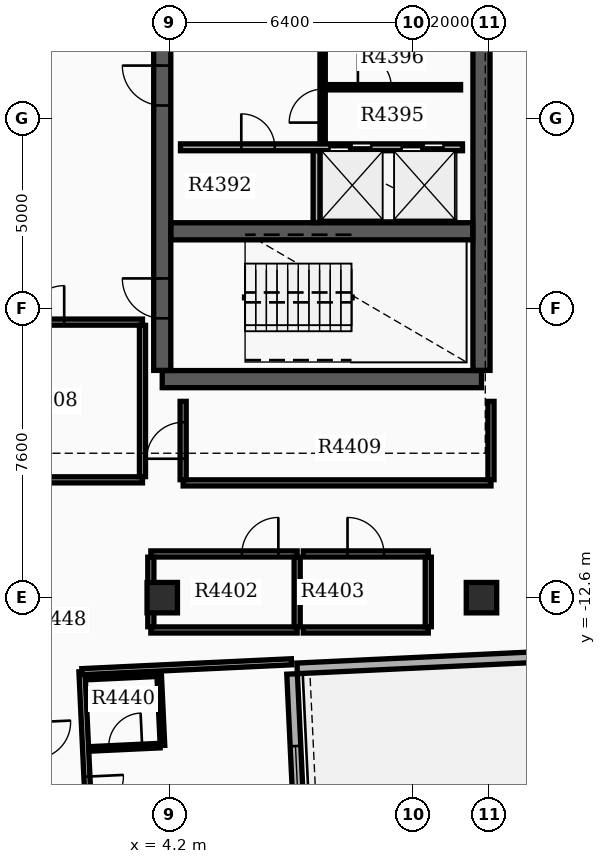
"""IFC4 building model, lengths in metres.
Left out: names, types, materials, properties, quantities, classifications, styles, units other than length and angle.
Written with IfcOpenShell. Run it as: python <this file> out.ifc"""

import sys

from ifc_helpers import new_model, si_unit, direction, frame, frame_2d, origin, origin_2d, place, context, subcontext, project, spatial, rectangle, extrude, element, fill, save


model = new_model("IFC4")
c1 = context("Model", 3, precision=1e-05, world=origin(), true_north=direction((0.0, 1.0)))
c2 = subcontext(c1, "Body", "Model", "MODEL_VIEW")
j1 = project(units=[si_unit("LENGTHUNIT", "METRE"), si_unit("PLANEANGLEUNIT", "RADIAN")], contexts=[c1])
p1 = place(None, origin())
s1 = spatial("IfcSite", under=j1, at=p1, CompositionType="ELEMENT")
p2 = place(p1, origin())
s2 = spatial("IfcBuilding", under=s1, at=p2, CompositionType="ELEMENT")
p3 = place(p2, frame((0.0, 0.0, 277.2)))
s3 = spatial("IfcBuildingStorey", under=s2, at=p3, CompositionType="ELEMENT", Elevation=277.2)
p4 = place(p3, frame((4.0, -6.85, 0.0), z_axis=(0.0, 0.0, 1.0), x_axis=(1.0, 0.0, 0.0)))
e1 = element("IfcWall", 1, at=p4, inside=s3, PredefinedType="SHEAR", context=c2, shape_type="SweptSolid", body=[
    extrude(rectangle(XDim=8.4, YDim=0.45, at=frame_2d((4.2, 0.0))), origin(), (0.0, 0.0, 1.0), 3.7),
])
p5 = place(p3, frame((4.0, -6.62, 0.0), z_axis=(0.0, 0.0, 1.0), x_axis=(0.0, 1.0, 0.0)))
e2 = element("IfcWall", 2, at=p5, inside=s3, PredefinedType="SHEAR", context=c2, shape_type="SweptSolid", body=[
    extrude(rectangle(XDim=11.34, YDim=0.45, at=frame_2d((5.67, 0.0))), origin(), (0.0, 0.0, 1.0), 3.7),
])
p6 = place(p5, frame((1.37, 0.0, 0.0)))
e3 = element("IfcOpeningElement", 3, at=p6, cuts=e2, PredefinedType="OPENING", context=c2, shape_type="SweptSolid", body=[
    extrude(rectangle(XDim=1.05, YDim=2.15, at=frame_2d((0.525, 1.075))), frame((0.0, 0.235, 0.0), z_axis=(0.0, -1.0, 0.0), x_axis=(1.0, 0.0, 0.0)), (0.0, 0.0, 1.0), 0.47),
])
p7 = place(p5, frame((6.97, 0.0, 0.0)))
e4 = element("IfcOpeningElement", 4, at=p7, cuts=e2, PredefinedType="OPENING", context=c2, shape_type="SweptSolid", body=[
    extrude(rectangle(XDim=1.05, YDim=2.15, at=frame_2d((0.525, 1.075))), frame((0.0, 0.235, 0.0), z_axis=(0.0, -1.0, 0.0), x_axis=(1.0, 0.0, 0.0)), (0.0, 0.0, 1.0), 0.47),
])
p8 = place(p3, frame((12.4, -6.62, 0.0), z_axis=(0.0, 0.0, 1.0), x_axis=(0.0, 1.0, 0.0)))
e5 = element("IfcWall", 5, at=p8, inside=s3, PredefinedType="SHEAR", context=c2, shape_type="SweptSolid", body=[
    extrude(rectangle(XDim=11.34, YDim=0.45, at=frame_2d((5.67, 0.0))), origin(), (0.0, 0.0, 1.0), 3.7),
])
p9 = place(p3, frame((4.23, -2.96, 0.0), z_axis=(0.0, 0.0, 1.0), x_axis=(1.0, 0.0, 0.0)))
e6 = element("IfcWall", 6, at=p9, inside=s3, PredefinedType="SHEAR", context=c2, shape_type="SweptSolid", body=[
    extrude(rectangle(XDim=7.94, YDim=0.45, at=frame_2d((3.97, 0.0))), origin(), (0.0, 0.0, 1.0), 3.7),
])
for number, where, z_axis, x_axis in (
    (7, (12.4, -12.6, 0.0), (0.0, 0.0, 1.0), (1.0, 0.0, 0.0)),
    (8, (4.0, -12.6, 0.0), (0.0, 0.0, 1.0), (1.0, 0.0, 0.0)),
):
    element("IfcColumn", number, at=place(p3, frame(where, z_axis=z_axis, x_axis=x_axis)), inside=s3, PredefinedType="COLUMN", context=c2, shape_type="SweptSolid", body=[
        extrude(rectangle(XDim=0.8, YDim=0.8, at=origin_2d()), origin(), (0.0, 0.0, 1.0), 3.9),
    ])
p10 = place(p3, frame((8.109, -29.291, 0.0), z_axis=(0.0, 0.0, 1.0), x_axis=(-0.047117735191, 0.998889342735, 0.0)))
e9 = element("IfcWall", 9, at=p10, inside=s3, PredefinedType="STANDARD", context=c2, shape_type="SweptSolid", body=[
    extrude(rectangle(XDim=14.7, YDim=0.28, at=frame_2d((7.35, 0.0))), origin(), (0.0, 0.0, 1.0), 3.18),
])
p11 = place(p10, frame((1.6, 0.0, 0.8)))
e10 = element("IfcOpeningElement", 10, at=p11, cuts=e9, PredefinedType="OPENING", context=c2, shape_type="SweptSolid", body=[
    extrude(rectangle(XDim=1.6, YDim=1.7, at=frame_2d((0.8, 0.85))), frame((0.0, 0.15, 0.0), z_axis=(0.0, -1.0, 0.0), x_axis=(1.0, 0.0, 0.0)), (0.0, 0.0, 1.0), 0.3),
])
p12 = place(p10, frame((4.8, 0.0, 0.8)))
e11 = element("IfcOpeningElement", 11, at=p12, cuts=e9, PredefinedType="OPENING", context=c2, shape_type="SweptSolid", body=[
    extrude(rectangle(XDim=1.6, YDim=1.7, at=frame_2d((0.8, 0.85))), frame((0.0, 0.15, 0.0), z_axis=(0.0, -1.0, 0.0), x_axis=(1.0, 0.0, 0.0)), (0.0, 0.0, 1.0), 0.3),
])
p13 = place(p10, frame((8.0, 0.0, 0.8)))
e12 = element("IfcOpeningElement", 12, at=p13, cuts=e9, PredefinedType="OPENING", context=c2, shape_type="SweptSolid", body=[
    extrude(rectangle(XDim=1.6, YDim=1.7, at=frame_2d((0.8, 0.85))), frame((0.0, 0.15, 0.0), z_axis=(0.0, -1.0, 0.0), x_axis=(1.0, 0.0, 0.0)), (0.0, 0.0, 1.0), 0.3),
])
p14 = place(p10, frame((11.2, 0.0, 0.8)))
e13 = element("IfcOpeningElement", 13, at=p14, cuts=e9, PredefinedType="OPENING", context=c2, shape_type="SweptSolid", body=[
    extrude(rectangle(XDim=1.6, YDim=1.7, at=frame_2d((0.8, 0.85))), frame((0.0, 0.15, 0.0), z_axis=(0.0, -1.0, 0.0), x_axis=(1.0, 0.0, 0.0)), (0.0, 0.0, 1.0), 0.3),
])
p15 = place(p3, frame((13.843, -14.164, 0.0), z_axis=(0.0, 0.0, 1.0), x_axis=(-0.998889082162, -0.047123258997, 0.0)))
e14 = element("IfcWall", 14, at=p15, inside=s3, PredefinedType="STANDARD", context=c2, shape_type="SweptSolid", body=[
    extrude(rectangle(XDim=6.3, YDim=0.28, at=frame_2d((3.15, 0.0))), origin(), (0.0, 0.0, 1.0), 3.18),
])
p16 = place(p3, frame((4.48, -0.75, 0.0), z_axis=(0.0, 0.0, 1.0), x_axis=(1.0, 0.0, 0.0)))
e15 = element("IfcWall", 15, at=p16, inside=s3, PredefinedType="SOLIDWALL", context=c2, shape_type="SweptSolid", body=[
    extrude(rectangle(XDim=7.42, YDim=0.18, at=frame_2d((3.71, 0.0))), origin(), (0.0, 0.0, 1.0), 3.17),
])
p17 = place(p16, frame((3.92, 0.0, 0.0)))
e16 = element("IfcOpeningElement", 16, at=p17, cuts=e15, PredefinedType="OPENING", context=c2, shape_type="SweptSolid", body=[
    extrude(rectangle(XDim=1.1, YDim=2.15, at=frame_2d((0.55, 1.075))), frame((0.0, 0.1, 0.0), z_axis=(0.0, -1.0, 0.0), x_axis=(1.0, 0.0, 0.0)), (0.0, 0.0, 1.0), 0.2),
])
p18 = place(p16, frame((5.82, 0.0, 0.0)))
e17 = element("IfcOpeningElement", 17, at=p18, cuts=e15, PredefinedType="OPENING", context=c2, shape_type="SweptSolid", body=[
    extrude(rectangle(XDim=1.1, YDim=2.15, at=frame_2d((0.55, 1.075))), frame((0.0, 0.1, 0.0), z_axis=(0.0, -1.0, 0.0), x_axis=(1.0, 0.0, 0.0)), (0.0, 0.0, 1.0), 0.2),
])
p19 = place(p16, frame((1.6, 0.0, 0.0)))
e18 = element("IfcOpeningElement", 18, at=p19, cuts=e15, PredefinedType="OPENING", context=c2, shape_type="SweptSolid", body=[
    extrude(rectangle(XDim=0.88, YDim=2.1, at=frame_2d((0.44, 1.05))), frame((0.0, 0.1, 0.0), z_axis=(0.0, -1.0, 0.0), x_axis=(1.0, 0.0, 0.0)), (0.0, 0.0, 1.0), 0.2),
])
p20 = place(p3, frame((8.06, -2.73, 0.0), z_axis=(0.0, 0.0, 1.0), x_axis=(0.0, 1.0, 0.0)))
e19 = element("IfcWall", 19, at=p20, inside=s3, PredefinedType="SOLIDWALL", context=c2, shape_type="SweptSolid", body=[
    extrude(rectangle(XDim=1.89, YDim=0.18, at=frame_2d((0.945, 0.0))), origin(), (0.0, 0.0, 1.0), 3.17),
])
p21 = place(p3, frame((8.22, -0.65, 0.0), z_axis=(0.0, 0.0, 1.0), x_axis=(0.0, 1.0, 0.0)))
e20 = element("IfcWall", 20, at=p21, inside=s3, PredefinedType="SOLIDWALL", context=c2, shape_type="SweptSolid", body=[
    extrude(rectangle(XDim=2.96, YDim=0.14, at=frame_2d((1.48, 0.0))), origin(), (0.0, 0.0, 1.0), 3.17),
])
p22 = place(p21, frame((0.55, 0.0, 0.0)))
e21 = element("IfcOpeningElement", 21, at=p22, cuts=e20, PredefinedType="OPENING", context=c2, shape_type="SweptSolid", body=[
    extrude(rectangle(XDim=0.88, YDim=2.1, at=frame_2d((0.44, 1.05))), frame((0.0, 0.08, 0.0), z_axis=(0.0, -1.0, 0.0), x_axis=(1.0, 0.0, 0.0)), (0.0, 0.0, 1.0), 0.16),
])
p23 = place(p3, frame((8.298, 0.83, 0.0), z_axis=(0.0, 0.0, 1.0), x_axis=(1.0, 0.0, 0.0)))
e22 = element("IfcWall", 22, at=p23, inside=s3, PredefinedType="PARTITIONING", context=c2, shape_type="SweptSolid", body=[
    extrude(rectangle(XDim=3.552, YDim=0.14, at=frame_2d((1.776, 0.0))), origin(), (0.0, 0.0, 1.0), 3.17),
])
p24 = place(p23, frame((0.85, 0.0, 0.0)))
e23 = element("IfcOpeningElement", 23, at=p24, cuts=e22, PredefinedType="OPENING", context=c2, shape_type="SweptSolid", body=[
    extrude(rectangle(XDim=0.88, YDim=2.1, at=frame_2d((0.44, 1.05))), frame((0.0, 0.08, 0.0), z_axis=(0.0, -1.0, 0.0), x_axis=(1.0, 0.0, 0.0)), (0.0, 0.0, 1.0), 0.16),
])
p25 = place(p3, frame((3.7, -13.45, 0.0), z_axis=(0.0, 0.0, 1.0), x_axis=(1.0, 0.0, 0.0)))
e24 = element("IfcWall", 24, at=p25, inside=s3, PredefinedType="PARTITIONING", context=c2, shape_type="SweptSolid", body=[
    extrude(rectangle(XDim=3.85, YDim=0.16, at=frame_2d((1.925, 0.0))), origin(), (0.0, 0.0, 1.0), 3.17),
])
p26 = place(p3, frame((3.7, -11.45, 0.0), z_axis=(0.0, 0.0, 1.0), x_axis=(1.0, 0.0, 0.0)))
e25 = element("IfcWall", 25, at=p26, inside=s3, PredefinedType="PARTITIONING", context=c2, shape_type="SweptSolid", body=[
    extrude(rectangle(XDim=3.85, YDim=0.16, at=frame_2d((1.925, 0.0))), origin(), (0.0, 0.0, 1.0), 3.17),
])
p27 = place(p26, frame((2.395, 0.0, 0.0)))
e26 = element("IfcOpeningElement", 26, at=p27, cuts=e25, PredefinedType="OPENING", context=c2, shape_type="SweptSolid", body=[
    extrude(rectangle(XDim=0.96, YDim=2.15, at=frame_2d((0.48, 1.075))), frame((0.0, 0.09, 0.0), z_axis=(0.0, -1.0, 0.0), x_axis=(1.0, 0.0, 0.0)), (0.0, 0.0, 1.0), 0.18),
])
for number, where, z_axis, x_axis in (
    (27, (3.7, -13.365, 0.0), (0.0, 0.0, 1.0), (0.0, 1.0, 0.0)),
    (28, (7.55, -13.365, 0.0), (0.0, 0.0, 1.0), (0.0, 1.0, 0.0)),
):
    element("IfcWall", number, at=place(p3, frame(where, z_axis=z_axis, x_axis=x_axis)), inside=s3, PredefinedType="PARTITIONING", context=c2, shape_type="SweptSolid", body=[
        extrude(rectangle(XDim=1.83, YDim=0.16, at=frame_2d((0.915, 0.0))), origin(), (0.0, 0.0, 1.0), 3.17),
    ])
p28 = place(p3, frame((7.71, -13.45, 0.0), z_axis=(0.0, 0.0, 1.0), x_axis=(1.0, 0.0, 0.0)))
e29 = element("IfcWall", 29, at=p28, inside=s3, PredefinedType="PARTITIONING", context=c2, shape_type="SweptSolid", body=[
    extrude(rectangle(XDim=3.29, YDim=0.16, at=frame_2d((1.645, 0.0))), origin(), (0.0, 0.0, 1.0), 3.17),
])
p29 = place(p3, frame((7.71, -11.45, 0.0), z_axis=(0.0, 0.0, 1.0), x_axis=(1.0, 0.0, 0.0)))
e30 = element("IfcWall", 30, at=p29, inside=s3, PredefinedType="PARTITIONING", context=c2, shape_type="SweptSolid", body=[
    extrude(rectangle(XDim=3.29, YDim=0.16, at=frame_2d((1.645, 0.0))), origin(), (0.0, 0.0, 1.0), 3.17),
])
p30 = place(p29, frame((1.165, 0.0, 0.0)))
e31 = element("IfcOpeningElement", 31, at=p30, cuts=e30, PredefinedType="OPENING", context=c2, shape_type="SweptSolid", body=[
    extrude(rectangle(XDim=0.96, YDim=2.15, at=frame_2d((0.48, 1.075))), frame((0.0, 0.09, 0.0), z_axis=(0.0, -1.0, 0.0), x_axis=(1.0, 0.0, 0.0)), (0.0, 0.0, 1.0), 0.18),
])
p31 = place(p3, frame((11.0, -13.365, 0.0), z_axis=(0.0, 0.0, 1.0), x_axis=(0.0, 1.0, 0.0)))
e32 = element("IfcWall", 32, at=p31, inside=s3, PredefinedType="PARTITIONING", context=c2, shape_type="SweptSolid", body=[
    extrude(rectangle(XDim=1.83, YDim=0.16, at=frame_2d((0.915, 0.0))), origin(), (0.0, 0.0, 1.0), 3.17),
])
p32 = place(p3, frame((-1.6, -9.5, 0.0), z_axis=(0.0, 0.0, 1.0), x_axis=(1.0, 0.0, 0.0)))
e33 = element("IfcWall", 33, at=p32, inside=s3, PredefinedType="PARTITIONING", context=c2, shape_type="SweptSolid", body=[
    extrude(rectangle(XDim=5.08, YDim=0.16, at=frame_2d((2.54, 0.0))), origin(), (0.0, 0.0, 1.0), 3.17),
])
p33 = place(p3, frame((-1.6, -5.35, 0.0), z_axis=(0.0, 0.0, 1.0), x_axis=(1.0, 0.0, 0.0)))
e34 = element("IfcWall", 34, at=p33, inside=s3, PredefinedType="PARTITIONING", context=c2, shape_type="SweptSolid", body=[
    extrude(rectangle(XDim=5.08, YDim=0.16, at=frame_2d((2.54, 0.0))), origin(), (0.0, 0.0, 1.0), 3.17),
])
p34 = place(p33, frame((2.06, 0.0, 0.0)))
e35 = element("IfcOpeningElement", 35, at=p34, cuts=e34, PredefinedType="OPENING", context=c2, shape_type="SweptSolid", body=[
    extrude(rectangle(XDim=0.96, YDim=2.15, at=frame_2d((0.48, 1.075))), frame((0.0, 0.09, 0.0), z_axis=(0.0, -1.0, 0.0), x_axis=(1.0, 0.0, 0.0)), (0.0, 0.0, 1.0), 0.18),
])
p35 = place(p3, frame((3.48, -9.415, 0.0), z_axis=(0.0, 0.0, 1.0), x_axis=(0.0, 1.0, 0.0)))
e36 = element("IfcWall", 36, at=p35, inside=s3, PredefinedType="PARTITIONING", context=c2, shape_type="SweptSolid", body=[
    extrude(rectangle(XDim=3.98, YDim=0.16, at=frame_2d((1.99, 0.0))), origin(), (0.0, 0.0, 1.0), 3.17),
])
p36 = place(p3, frame((4.55, -9.58, 0.0), z_axis=(0.0, 0.0, 1.0), x_axis=(1.0, 0.0, 0.0)))
e37 = element("IfcWall", 37, at=p36, inside=s3, PredefinedType="PARTITIONING", context=c2, shape_type="SweptSolid", body=[
    extrude(rectangle(XDim=8.1, YDim=0.16, at=frame_2d((4.05, 0.0))), origin(), (0.0, 0.0, 1.0), 3.17),
])
p37 = place(p3, frame((4.55, -9.495, 0.0), z_axis=(0.0, 0.0, 1.0), x_axis=(0.0, 1.0, 0.0)))
e38 = element("IfcWall", 38, at=p37, inside=s3, PredefinedType="PARTITIONING", context=c2, shape_type="SweptSolid", body=[
    extrude(rectangle(XDim=2.06, YDim=0.16, at=frame_2d((1.03, 0.0))), origin(), (0.0, 0.0, 1.0), 3.17),
])
p38 = place(p37, frame((0.55, 0.0, 0.0)))
e39 = element("IfcOpeningElement", 39, at=p38, cuts=e38, PredefinedType="OPENING", context=c2, shape_type="SweptSolid", body=[
    extrude(rectangle(XDim=0.96, YDim=2.15, at=frame_2d((0.48, 1.075))), frame((0.0, 0.09, 0.0), z_axis=(0.0, -1.0, 0.0), x_axis=(1.0, 0.0, 0.0)), (0.0, 0.0, 1.0), 0.18),
])
p39 = place(p3, frame((12.65, -9.495, 0.0), z_axis=(0.0, 0.0, 1.0), x_axis=(0.0, 1.0, 0.0)))
e40 = element("IfcWall", 40, at=p39, inside=s3, PredefinedType="PARTITIONING", context=c2, shape_type="SweptSolid", body=[
    extrude(rectangle(XDim=2.06, YDim=0.16, at=frame_2d((1.03, 0.0))), origin(), (0.0, 0.0, 1.0), 3.17),
])
p40 = place(p3, frame((1.887, -14.547, 0.0), z_axis=(0.0, 0.0, 1.0), x_axis=(0.047097674677, -0.998890288791, 0.0)))
e41 = element("IfcWall", 41, at=p40, inside=s3, PredefinedType="PARTITIONING", context=c2, shape_type="SweptSolid", body=[
    extrude(rectangle(XDim=15.012, YDim=0.16, at=frame_2d((7.506, 0.0))), origin(), (0.0, 0.0, 1.0), 3.17),
])
p41 = place(p40, frame((2.765, 0.0, 0.0)))
e42 = element("IfcOpeningElement", 42, at=p41, cuts=e41, PredefinedType="OPENING", context=c2, shape_type="SweptSolid", body=[
    extrude(rectangle(XDim=0.96, YDim=2.15, at=frame_2d((0.48, 1.075))), frame((0.0, 0.09, 0.0), z_axis=(0.0, -1.0, 0.0), x_axis=(1.0, 0.0, 0.0)), (0.0, 0.0, 1.0), 0.18),
])
p42 = place(p40, frame((11.381, 0.0, 0.0)))
e43 = element("IfcOpeningElement", 43, at=p42, cuts=e41, PredefinedType="OPENING", context=c2, shape_type="SweptSolid", body=[
    extrude(rectangle(XDim=0.96, YDim=2.15, at=frame_2d((0.48, 1.075))), frame((0.0, 0.09, 0.0), z_axis=(0.0, -1.0, 0.0), x_axis=(1.0, 0.0, 0.0)), (0.0, 0.0, 1.0), 0.18),
])
p43 = place(p3, frame((1.887, -14.547, 0.0), z_axis=(0.0, 0.0, 1.0), x_axis=(0.998889946563, 0.04710493239, 0.0)))
e44 = element("IfcWall", 44, at=p43, inside=s3, PredefinedType="PARTITIONING", context=c2, shape_type="SweptSolid", body=[
    extrude(rectangle(XDim=5.52, YDim=0.16, at=frame_2d((2.76, 0.0))), origin(), (0.0, 0.0, 1.0), 3.17),
])
p44 = place(p3, frame((2.123, -16.578, 0.0), z_axis=(0.0, 0.0, 1.0), x_axis=(0.998891083954, 0.047080807099, 0.0)))
e45 = element("IfcWall", 45, at=p44, inside=s3, PredefinedType="PARTITIONING", context=c2, shape_type="SweptSolid", body=[
    extrude(rectangle(XDim=1.82, YDim=0.12, at=frame_2d((0.91, 0.0))), origin(), (0.0, 0.0, 1.0), 3.17),
])
p45 = place(p44, frame((0.47, 0.0, 0.0)))
e46 = element("IfcOpeningElement", 46, at=p45, cuts=e45, PredefinedType="OPENING", context=c2, shape_type="SweptSolid", body=[
    extrude(rectangle(XDim=0.88, YDim=2.1, at=frame_2d((0.44, 1.05))), frame((0.0, 0.07, 0.0), z_axis=(0.0, -1.0, 0.0), x_axis=(1.0, 0.0, 0.0)), (0.0, 0.0, 1.0), 0.14),
])
p46 = place(p3, frame((2.035, -14.7, 0.0), z_axis=(0.0, 0.0, 1.0), x_axis=(0.998891083954, 0.047080807099, 0.0)))
e47 = element("IfcWall", 47, at=p46, inside=s3, PredefinedType="PARTITIONING", context=c2, shape_type="SweptSolid", body=[
    extrude(rectangle(XDim=1.82, YDim=0.12, at=frame_2d((0.91, 0.0))), origin(), (0.0, 0.0, 1.0), 3.17),
])
p47 = place(p3, frame((3.918, -14.612, 0.0), z_axis=(0.0, 0.0, 1.0), x_axis=(0.04701595088, -0.998894138717, 0.0)))
e48 = element("IfcWall", 48, at=p47, inside=s3, PredefinedType="PARTITIONING", context=c2, shape_type="SweptSolid", body=[
    extrude(rectangle(XDim=1.88, YDim=0.12, at=frame_2d((0.94, 0.0))), origin(), (0.0, 0.0, 1.0), 3.17),
])
p48 = place(p3, frame((0.569, -14.609, 0.0), z_axis=(0.0, 0.0, 1.0), x_axis=(0.047097674677, -0.998890288791, 0.0)))
e49 = element("IfcWall", 49, at=p48, inside=s3, PredefinedType="PARTITIONING", context=c2, shape_type="SweptSolid", body=[
    extrude(rectangle(XDim=15.012, YDim=0.16, at=frame_2d((7.506, 0.0))), origin(), (0.0, 0.0, 1.0), 3.17),
])
p49 = place(p48, frame((1.271, 0.0, 0.0)))
e50 = element("IfcOpeningElement", 50, at=p49, cuts=e49, PredefinedType="OPENING", context=c2, shape_type="SweptSolid", body=[
    extrude(rectangle(XDim=0.96, YDim=2.15, at=frame_2d((0.48, 1.075))), frame((0.0, 0.09, 0.0), z_axis=(0.0, -1.0, 0.0), x_axis=(1.0, 0.0, 0.0)), (0.0, 0.0, 1.0), 0.18),
])
p50 = place(p48, frame((11.381, 0.0, 0.0)))
e51 = element("IfcOpeningElement", 51, at=p50, cuts=e49, PredefinedType="OPENING", context=c2, shape_type="SweptSolid", body=[
    extrude(rectangle(XDim=0.96, YDim=2.15, at=frame_2d((0.48, 1.075))), frame((0.0, 0.09, 0.0), z_axis=(0.0, -1.0, 0.0), x_axis=(1.0, 0.0, 0.0)), (0.0, 0.0, 1.0), 0.18),
])
p51 = place(p14, origin())
e52 = element("IfcWindow", 52, at=p51, inside=s3, PartitioningType="SINGLE_PANEL", PredefinedType="WINDOW", context=c2, shape_type="SweptSolid", body=[
    extrude(rectangle(XDim=1.6, YDim=1.7, at=frame_2d((0.8, 0.85))), frame((0.0, 0.03, 0.0), z_axis=(0.0, -1.0, 0.0), x_axis=(1.0, 0.0, 0.0)), (0.0, 0.0, 1.0), 0.06),
])
fill(e13, e52)
p52 = place(p6, origin())
e53 = element("IfcDoor", 53, at=p52, inside=s3, OperationType="SINGLE_SWING_RIGHT", PredefinedType="DOOR", context=c2, shape_type="SweptSolid", body=[
    extrude(rectangle(XDim=1.05, YDim=2.15, at=frame_2d((0.525, 1.075))), frame((0.0, 0.025, 0.0), z_axis=(0.0, -1.0, 0.0), x_axis=(1.0, 0.0, 0.0)), (0.0, 0.0, 1.0), 0.05),
])
fill(e3, e53)
p53 = place(p7, origin())
e54 = element("IfcDoor", 54, at=p53, inside=s3, OperationType="SINGLE_SWING_RIGHT", PredefinedType="DOOR", context=c2, shape_type="SweptSolid", body=[
    extrude(rectangle(XDim=1.05, YDim=2.15, at=frame_2d((0.525, 1.075))), frame((0.0, 0.025, 0.0), z_axis=(0.0, -1.0, 0.0), x_axis=(1.0, 0.0, 0.0)), (0.0, 0.0, 1.0), 0.05),
])
fill(e4, e54)
p54 = place(p17, origin())
e55 = element("IfcDoor", 55, at=p54, inside=s3, OperationType="DOUBLE_DOOR_SLIDING", PredefinedType="DOOR", context=c2, shape_type="SweptSolid", body=[
    extrude(rectangle(XDim=1.1, YDim=2.15, at=frame_2d((0.55, 1.075))), frame((0.0, 0.025, 0.0), z_axis=(0.0, -1.0, 0.0), x_axis=(1.0, 0.0, 0.0)), (0.0, 0.0, 1.0), 0.05),
])
fill(e16, e55)
p55 = place(p18, origin())
e56 = element("IfcDoor", 56, at=p55, inside=s3, OperationType="DOUBLE_DOOR_SLIDING", PredefinedType="DOOR", context=c2, shape_type="SweptSolid", body=[
    extrude(rectangle(XDim=1.1, YDim=2.15, at=frame_2d((0.55, 1.075))), frame((0.0, 0.025, 0.0), z_axis=(0.0, -1.0, 0.0), x_axis=(1.0, 0.0, 0.0)), (0.0, 0.0, 1.0), 0.05),
])
fill(e17, e56)
p56 = place(p19, origin())
e57 = element("IfcDoor", 57, at=p56, inside=s3, OperationType="SINGLE_SWING_LEFT", PredefinedType="DOOR", context=c2, shape_type="SweptSolid", body=[
    extrude(rectangle(XDim=0.88, YDim=2.1, at=frame_2d((0.44, 1.05))), frame((0.0, 0.025, 0.0), z_axis=(0.0, -1.0, 0.0), x_axis=(1.0, 0.0, 0.0)), (0.0, 0.0, 1.0), 0.05),
])
fill(e18, e57)
p57 = place(p22, origin())
e58 = element("IfcDoor", 58, at=p57, inside=s3, OperationType="SINGLE_SWING_LEFT", PredefinedType="DOOR", context=c2, shape_type="SweptSolid", body=[
    extrude(rectangle(XDim=0.88, YDim=2.1, at=frame_2d((0.44, 1.05))), frame((0.0, 0.025, 0.0), z_axis=(0.0, -1.0, 0.0), x_axis=(1.0, 0.0, 0.0)), (0.0, 0.0, 1.0), 0.05),
])
fill(e21, e58)
p58 = place(p24, origin())
e59 = element("IfcDoor", 59, at=p58, inside=s3, OperationType="SINGLE_SWING_LEFT", PredefinedType="DOOR", context=c2, shape_type="SweptSolid", body=[
    extrude(rectangle(XDim=0.88, YDim=2.1, at=frame_2d((0.44, 1.05))), frame((0.0, 0.025, 0.0), z_axis=(0.0, -1.0, 0.0), x_axis=(1.0, 0.0, 0.0)), (0.0, 0.0, 1.0), 0.05),
])
fill(e23, e59)
p59 = place(p27, origin())
e60 = element("IfcDoor", 60, at=p59, inside=s3, OperationType="SINGLE_SWING_RIGHT", PredefinedType="DOOR", context=c2, shape_type="SweptSolid", body=[
    extrude(rectangle(XDim=0.96, YDim=2.15, at=frame_2d((0.48, 1.075))), frame((0.0, 0.025, 0.0), z_axis=(0.0, -1.0, 0.0), x_axis=(1.0, 0.0, 0.0)), (0.0, 0.0, 1.0), 0.05),
])
fill(e26, e60)
p60 = place(p30, origin())
e61 = element("IfcDoor", 61, at=p60, inside=s3, OperationType="SINGLE_SWING_LEFT", PredefinedType="DOOR", context=c2, shape_type="SweptSolid", body=[
    extrude(rectangle(XDim=0.96, YDim=2.15, at=frame_2d((0.48, 1.075))), frame((0.0, 0.025, 0.0), z_axis=(0.0, -1.0, 0.0), x_axis=(1.0, 0.0, 0.0)), (0.0, 0.0, 1.0), 0.05),
])
fill(e31, e61)
p61 = place(p34, origin())
e62 = element("IfcDoor", 62, at=p61, inside=s3, OperationType="SINGLE_SWING_RIGHT", PredefinedType="DOOR", context=c2, shape_type="SweptSolid", body=[
    extrude(rectangle(XDim=0.96, YDim=2.15, at=frame_2d((0.48, 1.075))), frame((0.0, 0.025, 0.0), z_axis=(0.0, -1.0, 0.0), x_axis=(1.0, 0.0, 0.0)), (0.0, 0.0, 1.0), 0.05),
])
fill(e35, e62)
p62 = place(p38, origin())
e63 = element("IfcDoor", 63, at=p62, inside=s3, OperationType="SINGLE_SWING_LEFT", PredefinedType="DOOR", context=c2, shape_type="SweptSolid", body=[
    extrude(rectangle(XDim=0.96, YDim=2.15, at=frame_2d((0.48, 1.075))), frame((0.0, 0.025, 0.0), z_axis=(0.0, -1.0, 0.0), x_axis=(1.0, 0.0, 0.0)), (0.0, 0.0, 1.0), 0.05),
])
fill(e39, e63)
p63 = place(p41, origin())
e64 = element("IfcDoor", 64, at=p63, inside=s3, OperationType="SINGLE_SWING_LEFT", PredefinedType="DOOR", context=c2, shape_type="SweptSolid", body=[
    extrude(rectangle(XDim=0.96, YDim=2.15, at=frame_2d((0.48, 1.075))), frame((0.0, 0.025, 0.0), z_axis=(0.0, -1.0, 0.0), x_axis=(1.0, 0.0, 0.0)), (0.0, 0.0, 1.0), 0.05),
])
fill(e42, e64)
p64 = place(p45, origin())
e65 = element("IfcDoor", 65, at=p64, inside=s3, OperationType="SINGLE_SWING_RIGHT", PredefinedType="DOOR", context=c2, shape_type="SweptSolid", body=[
    extrude(rectangle(XDim=0.88, YDim=2.1, at=frame_2d((0.44, 1.05))), frame((0.0, 0.025, 0.0), z_axis=(0.0, -1.0, 0.0), x_axis=(1.0, 0.0, 0.0)), (0.0, 0.0, 1.0), 0.05),
])
fill(e46, e65)
save(model, sys.argv[1])
